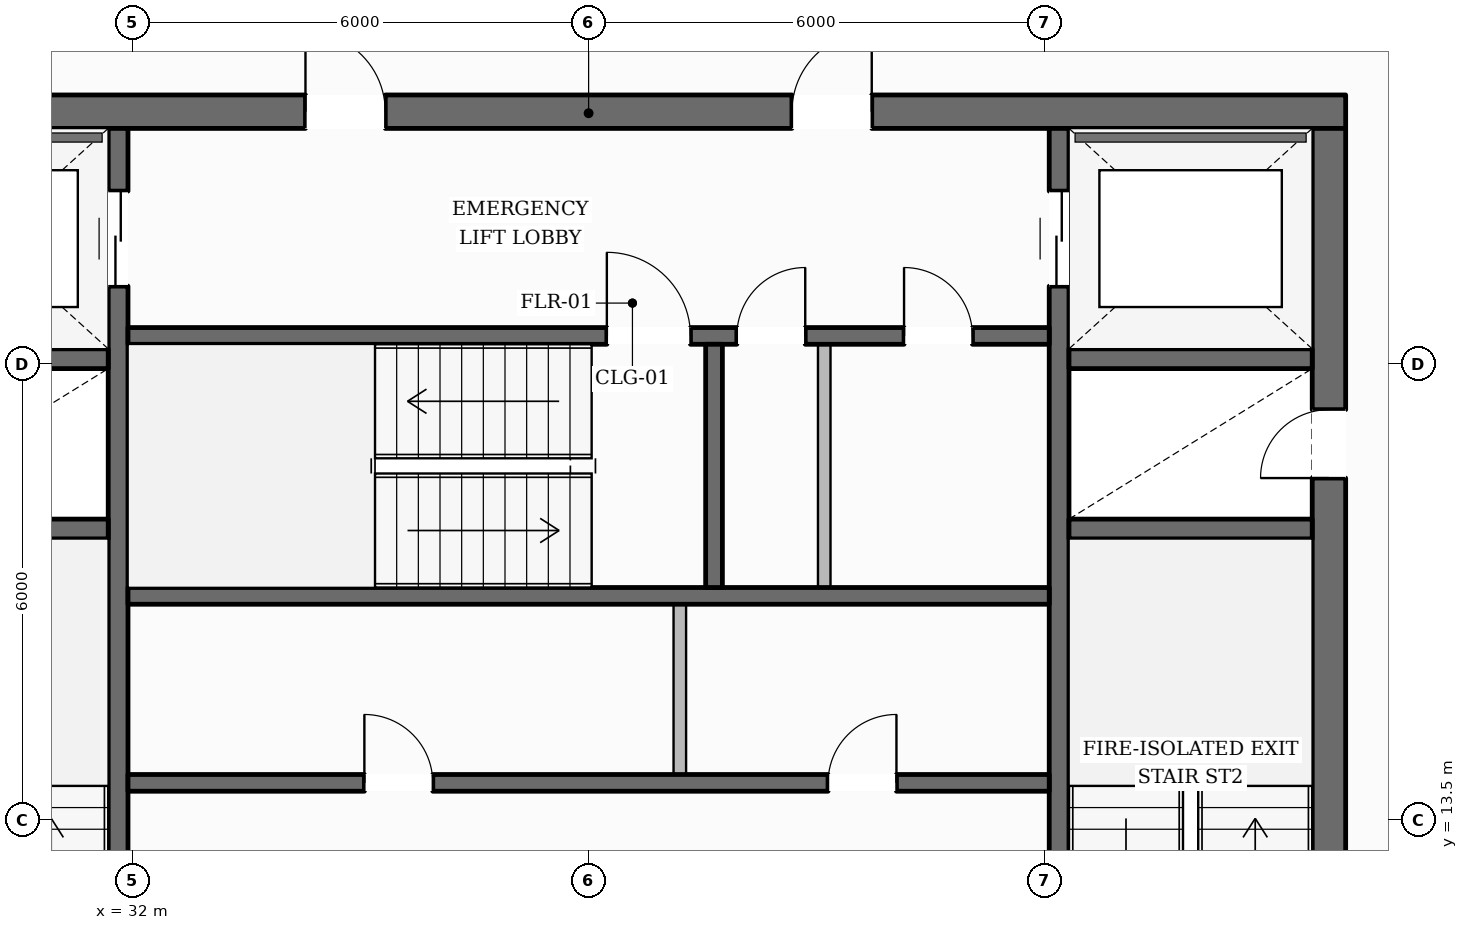
"""IFC4 building model, lengths in metres.
Left out: names, types, materials, properties, quantities, classifications, styles, units other than length and angle.
Written with IfcOpenShell. Run it as: python <this file> out.ifc"""

import sys

from ifc_helpers import new_model, si_unit, direction, frame, frame_2d, origin, place, context, subcontext, project, spatial, rectangle, extrude, element, fill, save


model = new_model("IFC4")
c1 = context("Model", 3, precision=1e-05, world=origin(), true_north=direction((0.0, 1.0)))
c2 = subcontext(c1, "Body", "Model", "MODEL_VIEW")
j1 = project(units=[si_unit("LENGTHUNIT", "METRE"), si_unit("PLANEANGLEUNIT", "RADIAN")], contexts=[c1])
p1 = place(None, origin())
s1 = spatial("IfcSite", under=j1, at=p1, CompositionType="ELEMENT")
p2 = place(p1, origin())
s2 = spatial("IfcBuilding", under=s1, at=p2, CompositionType="ELEMENT")
p3 = place(p2, frame((0.0, 0.0, 176.55)))
s3 = spatial("IfcBuildingStorey", under=s2, at=p3, CompositionType="ELEMENT", Elevation=176.55)
p4 = place(p3, frame((28.04, 22.82, 0.0), z_axis=(0.0, 0.0, 1.0), x_axis=(1.0, 0.0, 0.0)))
e1 = element("IfcWall", 1, at=p4, inside=s3, PredefinedType="SOLIDWALL", context=c2, shape_type="SweptSolid", body=[
    extrude(rectangle(XDim=19.92, YDim=0.44, at=frame_2d((9.96, 0.0))), origin(), (0.0, 0.0, 1.0), 3.6),
])
p5 = place(p4, frame((6.235, 0.0, 0.0)))
e2 = element("IfcOpeningElement", 2, at=p5, cuts=e1, PredefinedType="OPENING", context=c2, shape_type="SweptSolid", body=[
    extrude(rectangle(XDim=1.05, YDim=2.15, at=frame_2d((0.525, 1.075))), frame((0.0, 0.23, 0.0), z_axis=(0.0, -1.0, 0.0), x_axis=(1.0, 0.0, 0.0)), (0.0, 0.0, 1.0), 0.46),
])
p6 = place(p4, frame((12.635, 0.0, 0.0)))
e3 = element("IfcOpeningElement", 3, at=p6, cuts=e1, PredefinedType="OPENING", context=c2, shape_type="SweptSolid", body=[
    extrude(rectangle(XDim=1.05, YDim=2.15, at=frame_2d((0.525, 1.075))), frame((0.0, 0.23, 0.0), z_axis=(0.0, -1.0, 0.0), x_axis=(1.0, 0.0, 0.0)), (0.0, 0.0, 1.0), 0.46),
])
p7 = place(p3, frame((47.74, 9.6, 0.0), z_axis=(0.0, 0.0, 1.0), x_axis=(0.0, 1.0, 0.0)))
e4 = element("IfcWall", 4, at=p7, inside=s3, PredefinedType="SOLIDWALL", context=c2, shape_type="SweptSolid", body=[
    extrude(rectangle(XDim=13.0, YDim=0.44, at=frame_2d((6.5, 0.0))), origin(), (0.0, 0.0, 1.0), 3.6),
])
p8 = place(p7, frame((0.2, 0.0, 0.0)))
e5 = element("IfcOpeningElement", 5, at=p8, cuts=e4, PredefinedType="OPENING", context=c2, shape_type="SweptSolid", body=[
    extrude(rectangle(XDim=1.1, YDim=2.15, at=frame_2d((0.55, 1.075))), frame((0.0, 0.23, 0.0), z_axis=(0.0, -1.0, 0.0), x_axis=(1.0, 0.0, 0.0)), (0.0, 0.0, 1.0), 0.46),
])
p9 = place(p7, frame((8.4, 0.0, 0.0)))
e6 = element("IfcOpeningElement", 6, at=p9, cuts=e4, PredefinedType="OPENING", context=c2, shape_type="SweptSolid", body=[
    extrude(rectangle(XDim=0.9, YDim=2.1, at=frame_2d((0.45, 1.05))), frame((0.0, 0.23, 0.0), z_axis=(0.0, -1.0, 0.0), x_axis=(1.0, 0.0, 0.0)), (0.0, 0.0, 1.0), 0.46),
])
p10 = place(p3, frame((31.81, 9.6, 0.0), z_axis=(0.0, 0.0, 1.0), x_axis=(0.0, 1.0, 0.0)))
e7 = element("IfcWall", 7, at=p10, inside=s3, PredefinedType="SHEAR", context=c2, shape_type="SweptSolid", body=[
    extrude(rectangle(XDim=13.0, YDim=0.26, at=frame_2d((6.5, 0.0))), origin(), (0.0, 0.0, 1.0), 3.6),
])
p11 = place(p10, frame((10.925, 0.0, 0.0)))
e8 = element("IfcOpeningElement", 8, at=p11, cuts=e7, PredefinedType="OPENING", context=c2, shape_type="SweptSolid", body=[
    extrude(rectangle(XDim=1.25, YDim=2.25, at=frame_2d((0.625, 1.125))), frame((0.0, 0.14, 0.0), z_axis=(0.0, -1.0, 0.0), x_axis=(1.0, 0.0, 0.0)), (0.0, 0.0, 1.0), 0.28),
])
p12 = place(p3, frame((44.19, 9.6, 0.0), z_axis=(0.0, 0.0, 1.0), x_axis=(0.0, 1.0, 0.0)))
e9 = element("IfcWall", 9, at=p12, inside=s3, PredefinedType="SHEAR", context=c2, shape_type="SweptSolid", body=[
    extrude(rectangle(XDim=13.0, YDim=0.26, at=frame_2d((6.5, 0.0))), origin(), (0.0, 0.0, 1.0), 3.6),
])
p13 = place(p12, frame((10.925, 0.0, 0.0)))
e10 = element("IfcOpeningElement", 10, at=p13, cuts=e9, PredefinedType="OPENING", context=c2, shape_type="SweptSolid", body=[
    extrude(rectangle(XDim=1.25, YDim=2.25, at=frame_2d((0.625, 1.125))), frame((0.0, 0.14, 0.0), z_axis=(0.0, -1.0, 0.0), x_axis=(1.0, 0.0, 0.0)), (0.0, 0.0, 1.0), 0.28),
])
for number, where, z_axis, x_axis in (
    (11, (28.48, 17.33, 0.0), (0.0, 0.0, 1.0), (1.0, 0.0, 0.0)),
    (12, (28.48, 19.57, 0.0), (0.0, 0.0, 1.0), (1.0, 0.0, 0.0)),
    (13, (44.32, 17.33, 0.0), (0.0, 0.0, 1.0), (1.0, 0.0, 0.0)),
    (14, (44.32, 19.57, 0.0), (0.0, 0.0, 1.0), (1.0, 0.0, 0.0)),
):
    element("IfcWall", number, at=place(p3, frame(where, z_axis=z_axis, x_axis=x_axis)), inside=s3, PredefinedType="SHEAR", context=c2, shape_type="SweptSolid", body=[
        extrude(rectangle(XDim=3.2, YDim=0.26, at=frame_2d((1.6, 0.0))), origin(), (0.0, 0.0, 1.0), 3.6),
    ])
p14 = place(p3, frame((31.94, 19.87, 0.0), z_axis=(0.0, 0.0, 1.0), x_axis=(1.0, 0.0, 0.0)))
e15 = element("IfcWall", 15, at=p14, inside=s3, PredefinedType="SOLIDWALL", context=c2, shape_type="SweptSolid", body=[
    extrude(rectangle(XDim=12.12, YDim=0.22, at=frame_2d((6.06, 0.0))), origin(), (0.0, 0.0, 1.0), 3.6),
])
p15 = place(p14, frame((6.3, 0.0, 0.0)))
e16 = element("IfcOpeningElement", 16, at=p15, cuts=e15, PredefinedType="OPENING", context=c2, shape_type="SweptSolid", body=[
    extrude(rectangle(XDim=1.1, YDim=2.15, at=frame_2d((0.55, 1.075))), frame((0.0, 0.12, 0.0), z_axis=(0.0, -1.0, 0.0), x_axis=(1.0, 0.0, 0.0)), (0.0, 0.0, 1.0), 0.24),
])
p16 = place(p14, frame((8.01, 0.0, 0.0)))
e17 = element("IfcOpeningElement", 17, at=p16, cuts=e15, PredefinedType="OPENING", context=c2, shape_type="SweptSolid", body=[
    extrude(rectangle(XDim=0.9, YDim=2.1, at=frame_2d((0.45, 1.05))), frame((0.0, 0.12, 0.0), z_axis=(0.0, -1.0, 0.0), x_axis=(1.0, 0.0, 0.0)), (0.0, 0.0, 1.0), 0.24),
])
p17 = place(p14, frame((10.21, 0.0, 0.0)))
e18 = element("IfcOpeningElement", 18, at=p17, cuts=e15, PredefinedType="OPENING", context=c2, shape_type="SweptSolid", body=[
    extrude(rectangle(XDim=0.9, YDim=2.1, at=frame_2d((0.45, 1.05))), frame((0.0, 0.12, 0.0), z_axis=(0.0, -1.0, 0.0), x_axis=(1.0, 0.0, 0.0)), (0.0, 0.0, 1.0), 0.24),
])
p18 = place(p3, frame((31.94, 16.45, 0.0), z_axis=(0.0, 0.0, 1.0), x_axis=(1.0, 0.0, 0.0)))
e19 = element("IfcWall", 19, at=p18, inside=s3, PredefinedType="SOLIDWALL", context=c2, shape_type="SweptSolid", body=[
    extrude(rectangle(XDim=12.12, YDim=0.22, at=frame_2d((6.06, 0.0))), origin(), (0.0, 0.0, 1.0), 3.6),
])
p19 = place(p3, frame((39.65, 16.56, 0.0), z_axis=(0.0, 0.0, 1.0), x_axis=(0.0, 1.0, 0.0)))
e20 = element("IfcWall", 20, at=p19, inside=s3, PredefinedType="SOLIDWALL", context=c2, shape_type="SweptSolid", body=[
    extrude(rectangle(XDim=3.2, YDim=0.22, at=frame_2d((1.6, 0.0))), origin(), (0.0, 0.0, 1.0), 3.6),
])
p20 = place(p3, frame((31.94, 13.99, 0.0), z_axis=(0.0, 0.0, 1.0), x_axis=(1.0, 0.0, 0.0)))
e21 = element("IfcWall", 21, at=p20, inside=s3, PredefinedType="SOLIDWALL", context=c2, shape_type="SweptSolid", body=[
    extrude(rectangle(XDim=12.12, YDim=0.22, at=frame_2d((6.06, 0.0))), origin(), (0.0, 0.0, 1.0), 3.6),
])
p21 = place(p20, frame((3.11, 0.0, 0.0)))
e22 = element("IfcOpeningElement", 22, at=p21, cuts=e21, PredefinedType="OPENING", context=c2, shape_type="SweptSolid", body=[
    extrude(rectangle(XDim=0.9, YDim=2.1, at=frame_2d((0.45, 1.05))), frame((0.0, 0.12, 0.0), z_axis=(0.0, -1.0, 0.0), x_axis=(1.0, 0.0, 0.0)), (0.0, 0.0, 1.0), 0.24),
])
p22 = place(p20, frame((9.21, 0.0, 0.0)))
e23 = element("IfcOpeningElement", 23, at=p22, cuts=e21, PredefinedType="OPENING", context=c2, shape_type="SweptSolid", body=[
    extrude(rectangle(XDim=0.9, YDim=2.1, at=frame_2d((0.45, 1.05))), frame((0.0, 0.12, 0.0), z_axis=(0.0, -1.0, 0.0), x_axis=(1.0, 0.0, 0.0)), (0.0, 0.0, 1.0), 0.24),
])
p23 = place(p3, frame((15.13, 12.109, 0.0), z_axis=(0.0, 0.0, 1.0), x_axis=(0.493717133856, 0.869622557054, 0.0)))
e24 = element("IfcWall", 24, at=p23, inside=s3, PredefinedType="STANDARD", context=c2, shape_type="SweptSolid", body=[
    extrude(rectangle(XDim=37.245, YDim=0.35, at=frame_2d((18.623, 0.0))), origin(), (0.0, 0.0, 1.0), 3.132),
])
p24 = place(p23, frame((27.334, 0.0, 0.0)))
e25 = element("IfcOpeningElement", 25, at=p24, cuts=e24, PredefinedType="OPENING", context=c2, shape_type="SweptSolid", body=[
    extrude(rectangle(XDim=1.0, YDim=2.2, at=frame_2d((0.5, 1.1))), frame((0.0, 0.185, 0.0), z_axis=(0.0, -1.0, 0.0), x_axis=(1.0, 0.0, 0.0)), (0.0, 0.0, 1.0), 0.37),
])
p25 = place(p23, frame((33.014, 0.0, 0.65)))
e26 = element("IfcOpeningElement", 26, at=p25, cuts=e24, PredefinedType="OPENING", context=c2, shape_type="SweptSolid", body=[
    extrude(rectangle(XDim=1.45, YDim=1.75, at=frame_2d((0.725, 0.875))), frame((0.0, 0.185, 0.0), z_axis=(0.0, -1.0, 0.0), x_axis=(1.0, 0.0, 0.0)), (0.0, 0.0, 1.0), 0.37),
])
p26 = place(p23, frame((20.918, 0.0, 0.65)))
e27 = element("IfcOpeningElement", 27, at=p26, cuts=e24, PredefinedType="OPENING", context=c2, shape_type="SweptSolid", body=[
    extrude(rectangle(XDim=1.45, YDim=1.75, at=frame_2d((0.725, 0.875))), frame((0.0, 0.185, 0.0), z_axis=(0.0, -1.0, 0.0), x_axis=(1.0, 0.0, 0.0)), (0.0, 0.0, 1.0), 0.37),
])
p27 = place(p23, frame((8.822, 0.0, 0.65)))
e28 = element("IfcOpeningElement", 28, at=p27, cuts=e24, PredefinedType="OPENING", context=c2, shape_type="SweptSolid", body=[
    extrude(rectangle(XDim=1.45, YDim=1.75, at=frame_2d((0.725, 0.875))), frame((0.0, 0.185, 0.0), z_axis=(0.0, -1.0, 0.0), x_axis=(1.0, 0.0, 0.0)), (0.0, 0.0, 1.0), 0.37),
])
p28 = place(p23, frame((2.774, 0.0, 0.65)))
e29 = element("IfcOpeningElement", 29, at=p28, cuts=e24, PredefinedType="OPENING", context=c2, shape_type="SweptSolid", body=[
    extrude(rectangle(XDim=1.45, YDim=1.75, at=frame_2d((0.725, 0.875))), frame((0.0, 0.185, 0.0), z_axis=(0.0, -1.0, 0.0), x_axis=(1.0, 0.0, 0.0)), (0.0, 0.0, 1.0), 0.37),
])
p29 = place(p3, frame((42.622, 44.415, 0.0), z_axis=(0.0, 0.0, 1.0), x_axis=(0.501018185811, -0.865436755336, 0.0)))
e30 = element("IfcWall", 30, at=p29, inside=s3, PredefinedType="STANDARD", context=c2, shape_type="SweptSolid", body=[
    extrude(rectangle(XDim=37.783, YDim=0.35, at=frame_2d((18.892, 0.0))), origin(), (0.0, 0.0, 1.0), 3.132),
])
p30 = place(p29, frame((27.737, 0.0, 0.0)))
e31 = element("IfcOpeningElement", 31, at=p30, cuts=e30, PredefinedType="OPENING", context=c2, shape_type="SweptSolid", body=[
    extrude(rectangle(XDim=1.0, YDim=2.2, at=frame_2d((0.5, 1.1))), frame((0.0, 0.185, 0.0), z_axis=(0.0, -1.0, 0.0), x_axis=(1.0, 0.0, 0.0)), (0.0, 0.0, 1.0), 0.37),
])
p31 = place(p29, frame((33.513, 0.0, 0.65)))
e32 = element("IfcOpeningElement", 32, at=p31, cuts=e30, PredefinedType="OPENING", context=c2, shape_type="SweptSolid", body=[
    extrude(rectangle(XDim=1.45, YDim=1.75, at=frame_2d((0.725, 0.875))), frame((0.0, 0.185, 0.0), z_axis=(0.0, -1.0, 0.0), x_axis=(1.0, 0.0, 0.0)), (0.0, 0.0, 1.0), 0.37),
])
p32 = place(p29, frame((21.235, 0.0, 0.65)))
e33 = element("IfcOpeningElement", 33, at=p32, cuts=e30, PredefinedType="OPENING", context=c2, shape_type="SweptSolid", body=[
    extrude(rectangle(XDim=1.45, YDim=1.75, at=frame_2d((0.725, 0.875))), frame((0.0, 0.185, 0.0), z_axis=(0.0, -1.0, 0.0), x_axis=(1.0, 0.0, 0.0)), (0.0, 0.0, 1.0), 0.37),
])
p33 = place(p29, frame((8.958, 0.0, 0.65)))
e34 = element("IfcOpeningElement", 34, at=p33, cuts=e30, PredefinedType="OPENING", context=c2, shape_type="SweptSolid", body=[
    extrude(rectangle(XDim=1.45, YDim=1.75, at=frame_2d((0.725, 0.875))), frame((0.0, 0.185, 0.0), z_axis=(0.0, -1.0, 0.0), x_axis=(1.0, 0.0, 0.0)), (0.0, 0.0, 1.0), 0.37),
])
p34 = place(p29, frame((2.819, 0.0, 0.65)))
e35 = element("IfcOpeningElement", 35, at=p34, cuts=e30, PredefinedType="OPENING", context=c2, shape_type="SweptSolid", body=[
    extrude(rectangle(XDim=1.45, YDim=1.75, at=frame_2d((0.725, 0.875))), frame((0.0, 0.185, 0.0), z_axis=(0.0, -1.0, 0.0), x_axis=(1.0, 0.0, 0.0)), (0.0, 0.0, 1.0), 0.37),
])
p35 = place(p3, frame((39.2, 14.1, 0.0), z_axis=(0.0, 0.0, 1.0), x_axis=(0.0, 1.0, 0.0)))
e36 = element("IfcWall", 36, at=p35, inside=s3, PredefinedType="PARTITIONING", context=c2, shape_type="SweptSolid", body=[
    extrude(rectangle(XDim=2.24, YDim=0.165, at=frame_2d((1.12, 0.0))), origin(), (0.0, 0.0, 1.0), 3.6),
])
p36 = place(p3, frame((41.1, 16.56, 0.0), z_axis=(0.0, 0.0, 1.0), x_axis=(0.0, 1.0, 0.0)))
e37 = element("IfcWall", 37, at=p36, inside=s3, PredefinedType="PARTITIONING", context=c2, shape_type="SweptSolid", body=[
    extrude(rectangle(XDim=3.2, YDim=0.165, at=frame_2d((1.6, 0.0))), origin(), (0.0, 0.0, 1.0), 3.6),
])
p37 = place(p15, origin())
e38 = element("IfcDoor", 38, at=p37, inside=s3, OperationType="SINGLE_SWING_LEFT", PredefinedType="DOOR", context=c2, shape_type="SweptSolid", body=[
    extrude(rectangle(XDim=1.1, YDim=2.15, at=frame_2d((0.55, 1.075))), frame((0.0, 0.025, 0.0), z_axis=(0.0, -1.0, 0.0), x_axis=(1.0, 0.0, 0.0)), (0.0, 0.0, 1.0), 0.05),
])
fill(e16, e38)
p38 = place(p9, origin())
e39 = element("IfcDoor", 39, at=p38, inside=s3, OperationType="SINGLE_SWING_LEFT", PredefinedType="DOOR", context=c2, shape_type="SweptSolid", body=[
    extrude(rectangle(XDim=0.9, YDim=2.1, at=frame_2d((0.45, 1.05))), frame((0.0, 0.025, 0.0), z_axis=(0.0, -1.0, 0.0), x_axis=(1.0, 0.0, 0.0)), (0.0, 0.0, 1.0), 0.05),
])
fill(e6, e39)
p39 = place(p5, origin())
e40 = element("IfcDoor", 40, at=p39, inside=s3, OperationType="SINGLE_SWING_LEFT", PredefinedType="DOOR", context=c2, shape_type="SweptSolid", body=[
    extrude(rectangle(XDim=1.05, YDim=2.15, at=frame_2d((0.525, 1.075))), frame((0.0, 0.025, 0.0), z_axis=(0.0, -1.0, 0.0), x_axis=(1.0, 0.0, 0.0)), (0.0, 0.0, 1.0), 0.05),
])
fill(e2, e40)
p40 = place(p6, origin())
e41 = element("IfcDoor", 41, at=p40, inside=s3, OperationType="SINGLE_SWING_RIGHT", PredefinedType="DOOR", context=c2, shape_type="SweptSolid", body=[
    extrude(rectangle(XDim=1.05, YDim=2.15, at=frame_2d((0.525, 1.075))), frame((0.0, 0.025, 0.0), z_axis=(0.0, -1.0, 0.0), x_axis=(1.0, 0.0, 0.0)), (0.0, 0.0, 1.0), 0.05),
])
fill(e3, e41)
p41 = place(p11, origin())
e42 = element("IfcDoor", 42, at=p41, inside=s3, OperationType="DOUBLE_DOOR_SLIDING", PredefinedType="DOOR", context=c2, shape_type="SweptSolid", body=[
    extrude(rectangle(XDim=1.25, YDim=2.25, at=frame_2d((0.625, 1.125))), frame((0.0, 0.025, 0.0), z_axis=(0.0, -1.0, 0.0), x_axis=(1.0, 0.0, 0.0)), (0.0, 0.0, 1.0), 0.05),
])
fill(e8, e42)
p42 = place(p13, origin())
e43 = element("IfcDoor", 43, at=p42, inside=s3, OperationType="DOUBLE_DOOR_SLIDING", PredefinedType="DOOR", context=c2, shape_type="SweptSolid", body=[
    extrude(rectangle(XDim=1.25, YDim=2.25, at=frame_2d((0.625, 1.125))), frame((0.0, 0.025, 0.0), z_axis=(0.0, -1.0, 0.0), x_axis=(1.0, 0.0, 0.0)), (0.0, 0.0, 1.0), 0.05),
])
fill(e10, e43)
p43 = place(p21, origin())
e44 = element("IfcDoor", 44, at=p43, inside=s3, OperationType="SINGLE_SWING_LEFT", PredefinedType="DOOR", context=c2, shape_type="SweptSolid", body=[
    extrude(rectangle(XDim=0.9, YDim=2.1, at=frame_2d((0.45, 1.05))), frame((0.0, 0.025, 0.0), z_axis=(0.0, -1.0, 0.0), x_axis=(1.0, 0.0, 0.0)), (0.0, 0.0, 1.0), 0.05),
])
fill(e22, e44)
p44 = place(p22, origin())
e45 = element("IfcDoor", 45, at=p44, inside=s3, OperationType="SINGLE_SWING_RIGHT", PredefinedType="DOOR", context=c2, shape_type="SweptSolid", body=[
    extrude(rectangle(XDim=0.9, YDim=2.1, at=frame_2d((0.45, 1.05))), frame((0.0, 0.025, 0.0), z_axis=(0.0, -1.0, 0.0), x_axis=(1.0, 0.0, 0.0)), (0.0, 0.0, 1.0), 0.05),
])
fill(e23, e45)
p45 = place(p16, origin())
e46 = element("IfcDoor", 46, at=p45, inside=s3, OperationType="SINGLE_SWING_RIGHT", PredefinedType="DOOR", context=c2, shape_type="SweptSolid", body=[
    extrude(rectangle(XDim=0.9, YDim=2.1, at=frame_2d((0.45, 1.05))), frame((0.0, 0.025, 0.0), z_axis=(0.0, -1.0, 0.0), x_axis=(1.0, 0.0, 0.0)), (0.0, 0.0, 1.0), 0.05),
])
fill(e17, e46)
p46 = place(p17, origin())
e47 = element("IfcDoor", 47, at=p46, inside=s3, OperationType="SINGLE_SWING_LEFT", PredefinedType="DOOR", context=c2, shape_type="SweptSolid", body=[
    extrude(rectangle(XDim=0.9, YDim=2.1, at=frame_2d((0.45, 1.05))), frame((0.0, 0.025, 0.0), z_axis=(0.0, -1.0, 0.0), x_axis=(1.0, 0.0, 0.0)), (0.0, 0.0, 1.0), 0.05),
])
fill(e18, e47)
save(model, sys.argv[1])
